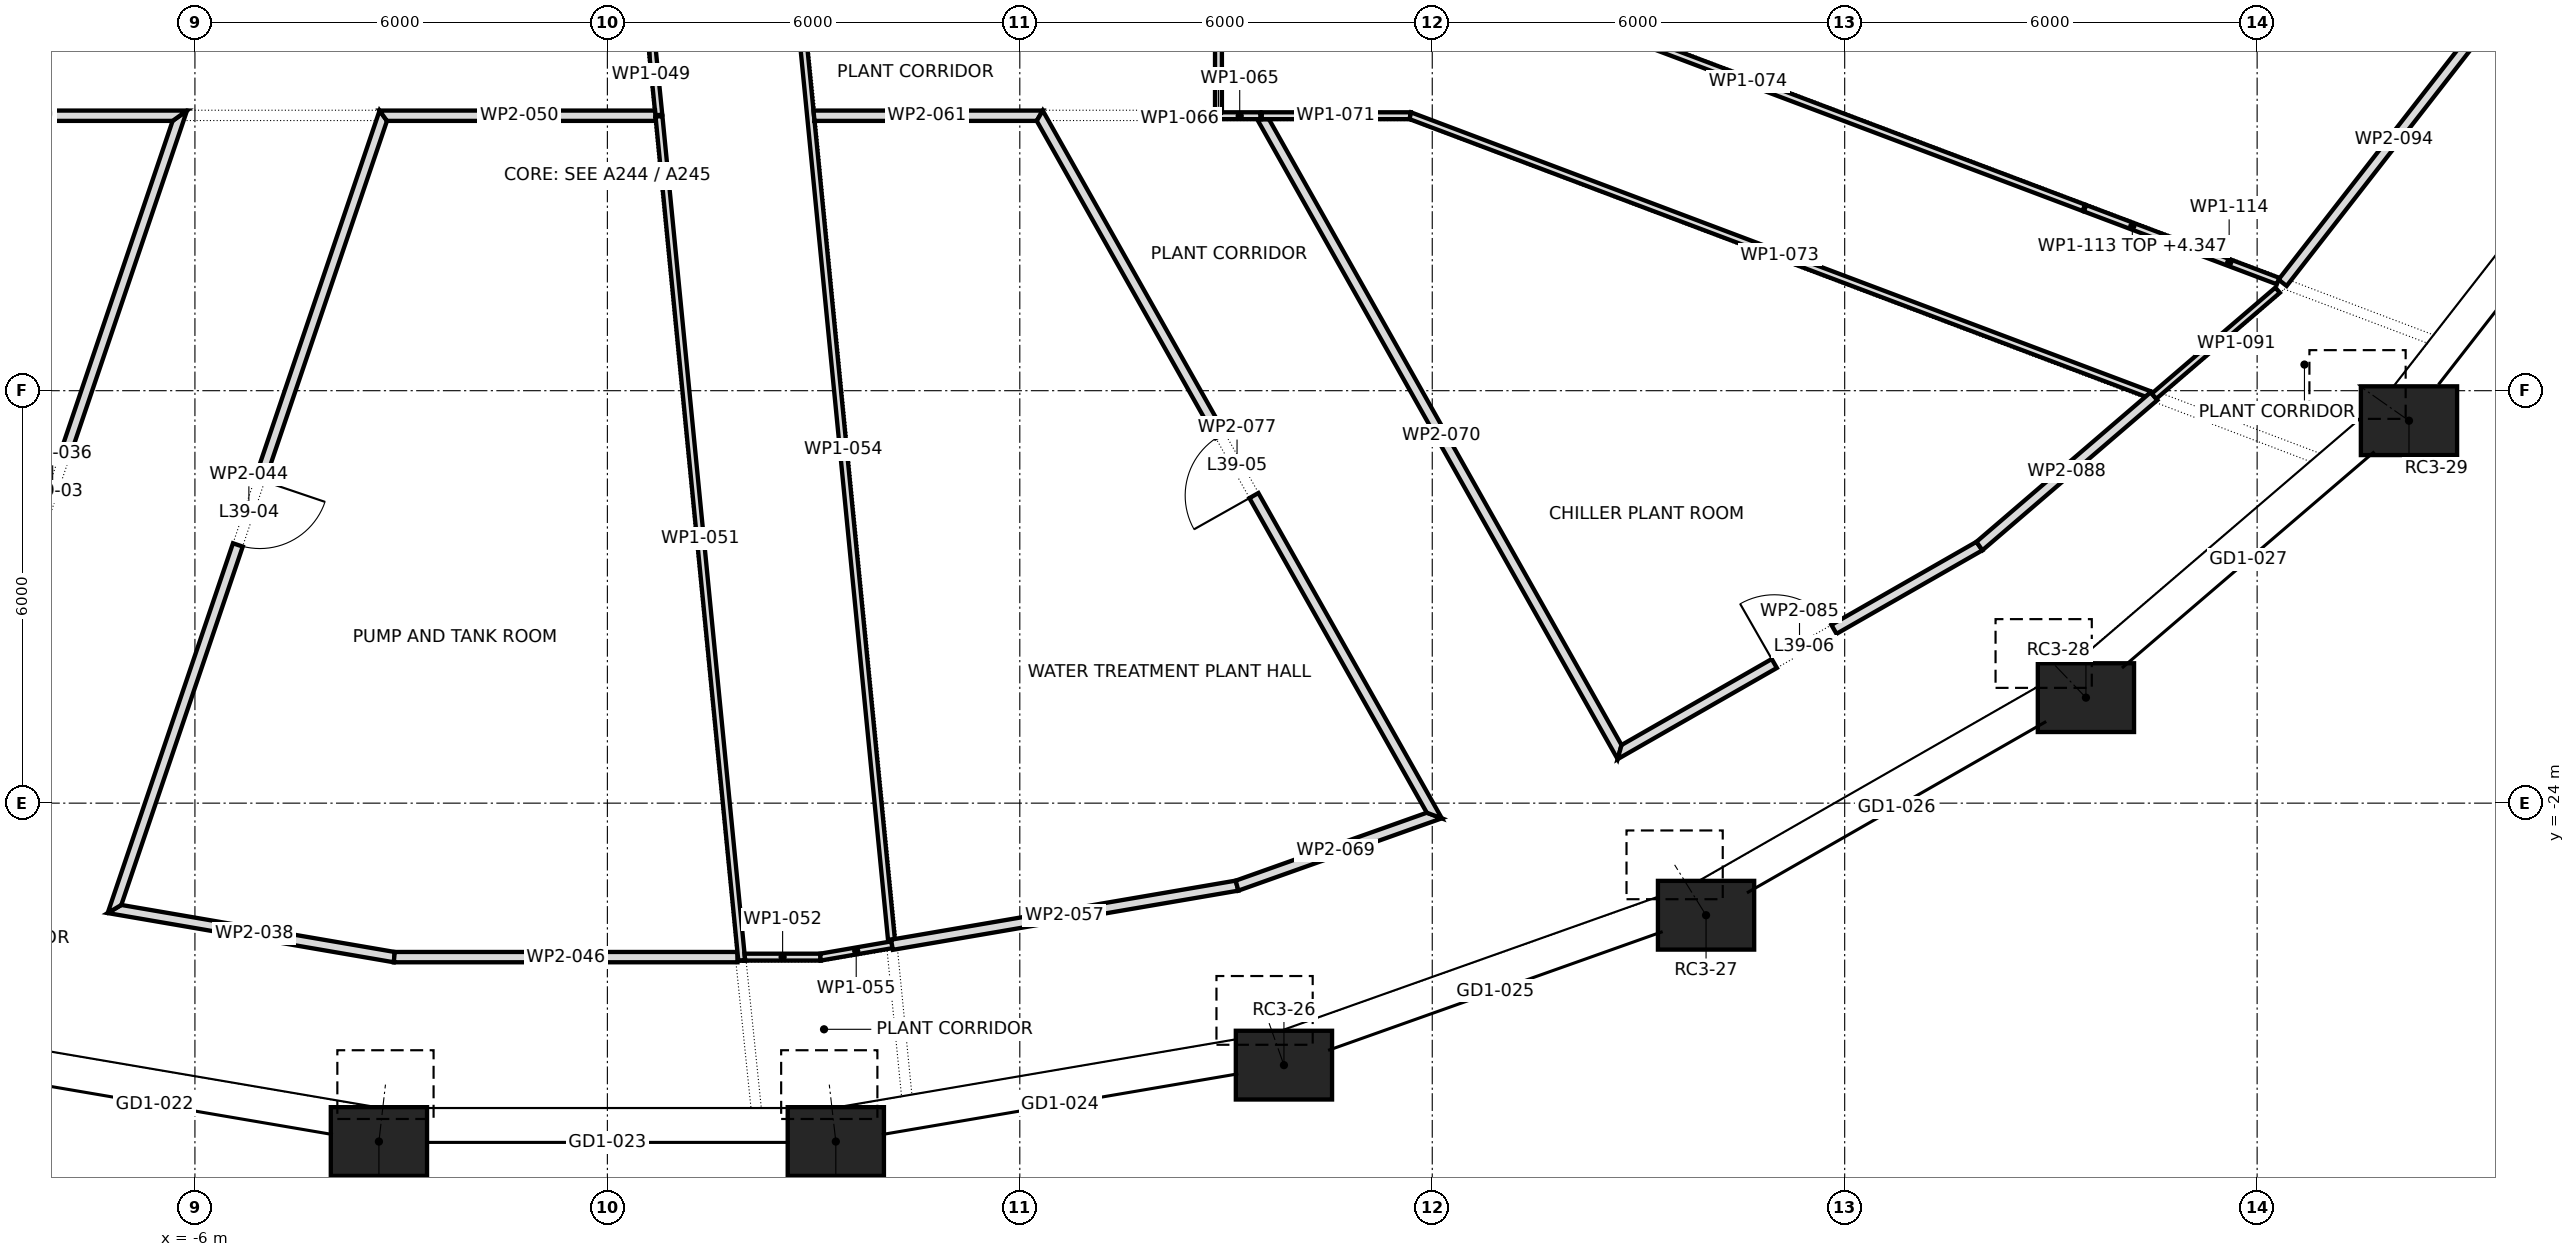
"""IFC4 building model, lengths in metres.
Left out: names, types, materials, properties, quantities, classifications, styles, units other than length and angle.
Written with IfcOpenShell. Run it as: python <this file> out.ifc"""

import sys

from ifc_helpers import new_model, si_unit, direction, frame, frame_2d, origin, origin_2d, place, context, subcontext, project, spatial, polyline, rectangle, outline, extrude, element, fill, save


model = new_model("IFC4")
c1 = context("Model", 3, precision=1e-05, world=origin(), true_north=direction((0.0, 1.0)))
c2 = subcontext(c1, "Body", "Model", "MODEL_VIEW")
j1 = project(units=[si_unit("LENGTHUNIT", "METRE"), si_unit("PLANEANGLEUNIT", "RADIAN")], contexts=[c1])
p1 = place(None, origin())
s1 = spatial("IfcSite", under=j1, at=p1, CompositionType="ELEMENT")
p2 = place(p1, origin())
s2 = spatial("IfcBuilding", under=s1, at=p2, CompositionType="ELEMENT")
p3 = place(p2, frame((0.0, 0.0, 173.5)))
s3 = spatial("IfcBuildingStorey", under=s2, at=p3, CompositionType="ELEMENT", Elevation=173.5)
for number, where, z_axis, x_axis in (
    (1, (-3.323, -28.923, 0.078), (0.018, 0.156, 0.988), (-0.993, 0.114, 0.0)),
    (2, (3.323, -28.923, 0.078), (-0.018, 0.156, 0.988), (-0.993, -0.114, 0.0)),
):
    element("IfcColumn", number, at=place(p3, frame(where, z_axis=z_axis, x_axis=x_axis)), inside=s3, PredefinedType="COLUMN", context=c2, shape_type="SweptSolid", body=[
        extrude(rectangle(XDim=1.4, YDim=1.0, at=origin_2d()), origin(), (0.0, 0.0, 1.0), 5.31),
    ])
p4 = place(p3, frame((9.843, -27.811, 0.079), z_axis=(-0.053064720362, 0.149997502446, 0.987261305184), x_axis=(-0.942744642547, -0.333515425352, 0.0)))
e3 = element("IfcColumn", 3, at=p4, inside=s3, PredefinedType="COLUMN", context=c2, shape_type="SweptSolid", body=[
    extrude(rectangle(XDim=1.4, YDim=1.0, at=origin_2d()), origin(), (0.0, 0.0, 1.0), 5.309),
])
p5 = place(p3, frame((15.983, -25.631, 0.081), z_axis=(-0.086138821713, 0.138107251256, 0.98666432516), x_axis=(-0.848490015543, -0.529211388316, 0.0)))
e4 = element("IfcColumn", 4, at=p5, inside=s3, PredefinedType="COLUMN", context=c2, shape_type="SweptSolid", body=[
    extrude(rectangle(XDim=1.4, YDim=1.0, at=origin_2d()), origin(), (0.0, 0.0, 1.0), 5.309),
])
p6 = place(p3, frame((21.51, -22.465, 0.083), z_axis=(-0.115812481815, 0.12096379157, 0.985877898213), x_axis=(-0.722319686129, -0.691559304059, 0.0)))
e5 = element("IfcColumn", 5, at=p6, inside=s3, PredefinedType="COLUMN", context=c2, shape_type="SweptSolid", body=[
    extrude(rectangle(XDim=1.4, YDim=1.0, at=origin_2d()), origin(), (0.0, 0.0, 1.0), 5.308),
])
p7 = place(p3, frame((26.209, -18.437, 0.086), z_axis=(-0.140981154169, 0.099215774729, 0.985028194629), x_axis=(-0.575519842584, -0.817787815262, 0.0)))
e6 = element("IfcColumn", 6, at=p7, inside=s3, PredefinedType="COLUMN", context=c2, shape_type="SweptSolid", body=[
    extrude(rectangle(XDim=1.4, YDim=1.0, at=origin_2d()), origin(), (0.0, 0.0, 1.0), 5.308),
])
p8 = place(p3, frame((-9.944, -25.002, 0.0), z_axis=(0.0, 0.0, 1.0), x_axis=(0.320636430017, 0.947202343613, 0.0)))
e7 = element("IfcWall", 7, at=p8, inside=s3, PredefinedType="PARTITIONING", context=c2, shape_type="SweptSolid", body=[
    extrude(outline(polyline([(0.0, -0.075), (1.953, -0.075), (3.906, -0.075), (5.86, -0.075), (7.813, -0.075), (9.766, -0.075), (11.72, -0.075), (11.511, 0.075), (9.617, 0.075), (7.724, 0.075), (5.831, 0.075), (3.938, 0.075), (2.045, 0.075), (0.152, 0.075), (0.0, -0.075), (0.0, -0.075)])), origin(), (0.0, 0.0, 1.0), 5.1),
])
p9 = place(p8, frame((5.346, 0.0, 0.0)))
e8 = element("IfcOpeningElement", 8, at=p9, cuts=e7, PredefinedType="OPENING", context=c2, shape_type="SweptSolid", body=[
    extrude(rectangle(XDim=1.0, YDim=2.1, at=frame_2d((0.5, 1.05))), frame((0.0, 0.087, 0.0), z_axis=(0.0, -1.0, 0.0), x_axis=(1.0, 0.0, 0.0)), (0.0, 0.0, 1.0), 0.174),
])
p10 = place(p3, frame((-7.257, -25.525, 0.0), z_axis=(0.0, 0.0, 1.0), x_axis=(0.985526115986, -0.16952367006, 0.0)))
e9 = element("IfcWall", 9, at=p10, inside=s3, PredefinedType="PARTITIONING", context=c2, shape_type="SweptSolid", body=[
    extrude(outline(polyline([(4.224, -0.075), (4.224, -0.073), (4.211, 0.075), (2.866, 0.075), (1.521, 0.075), (0.176, 0.075), (0.0, -0.075), (1.408, -0.075), (2.816, -0.075), (4.224, -0.075)])), origin(), (0.0, 0.0, 1.0), 5.1),
])
p11 = place(p3, frame((-6.115, -14.0, 0.0), z_axis=(0.0, 0.0, 1.0), x_axis=(-1.0, 0.0, 0.0)))
e10 = element("IfcWall", 10, at=p11, inside=s3, PredefinedType="PARTITIONING", context=c2, shape_type="SweptSolid", body=[
    extrude(outline(polyline([(0.0, -0.075), (1.611, -0.075), (3.223, -0.075), (4.834, -0.075), (4.99, 0.075), (3.397, 0.075), (1.803, 0.075), (0.209, 0.075), (0.104, 0.0), (0.0, -0.075)])), origin(), (0.0, 0.0, 1.0), 5.1),
])
p12 = place(p3, frame((-3.243, -13.949, 0.0), z_axis=(0.0, 0.0, 1.0), x_axis=(-0.320918229821, -0.947106905142, 0.0)))
e11 = element("IfcWall", 11, at=p12, inside=s3, PredefinedType="PARTITIONING", context=c2, shape_type="SweptSolid", body=[
    extrude(outline(polyline([(12.326, -0.075), (12.326, -0.075), (12.15, 0.075), (10.43, 0.075), (8.71, 0.075), (6.989, 0.075), (5.269, 0.075), (3.548, 0.075), (1.828, 0.075), (0.107, 0.075), (0.0, -0.075), (0.0, -0.075), (1.761, -0.075), (3.522, -0.075), (5.282, -0.075), (7.043, -0.075), (8.804, -0.075), (10.565, -0.075), (12.326, -0.075)])), origin(), (0.0, 0.0, 1.0), 5.1),
])
p13 = place(p12, frame((5.646, 0.0, 0.0)))
e12 = element("IfcOpeningElement", 12, at=p13, cuts=e11, PredefinedType="OPENING", context=c2, shape_type="SweptSolid", body=[
    extrude(rectangle(XDim=1.0, YDim=2.1, at=frame_2d((0.5, 1.05))), frame((0.0, 0.087, 0.0), z_axis=(0.0, -1.0, 0.0), x_axis=(1.0, 0.0, 0.0)), (0.0, 0.0, 1.0), 0.174),
])
p14 = place(p3, frame((-3.106, -26.24, 0.0), z_axis=(0.0, 0.0, 1.0), x_axis=(1.0, 0.0, 0.0)))
e13 = element("IfcWall", 13, at=p14, inside=s3, PredefinedType="PARTITIONING", context=c2, shape_type="SweptSolid", body=[
    extrude(outline(polyline([(4.999, 0.075), (3.337, 0.075), (1.675, 0.075), (0.013, 0.075), (0.0, -0.075), (1.666, -0.075), (3.333, -0.075), (4.999, -0.075), (4.999, 0.075)])), origin(), (0.0, 0.0, 1.0), 5.1),
])
p15 = place(p3, frame((0.52, -11.7, 0.0), z_axis=(0.0, 0.0, 1.0), x_axis=(0.099535104197, -0.995034051192, 0.0)))
e14 = element("IfcWall", 14, at=p15, inside=s3, PredefinedType="PARTITIONING", context=c2, shape_type="SweptSolid", body=[
    extrude(outline(polyline([(0.0, -0.05), (2.231, -0.05), (2.231, -0.05), (2.233, -0.05), (2.311, -0.05), (2.311, -0.006), (2.311, 0.05), (0.0, 0.05), (0.0, -0.05)])), origin(), (0.0, 0.0, 1.0), 5.1),
])
p16 = place(p3, frame((0.707, -14.0, 0.0), z_axis=(0.0, 0.0, 1.0), x_axis=(-1.0, 0.0, 0.0)))
e15 = element("IfcWall", 15, at=p16, inside=s3, PredefinedType="PARTITIONING", context=c2, shape_type="SweptSolid", body=[
    extrude(outline(polyline([(4.021, -0.075), (4.021, -0.075), (3.967, 0.0), (3.913, 0.075), (1.957, 0.075), (0.0, 0.075), (0.0, 0.074), (0.007, 0.004), (0.007, 0.004), (0.015, -0.075), (1.35, -0.075), (2.685, -0.075), (4.021, -0.075)])), origin(), (0.0, 0.0, 1.0), 5.1),
])
p17 = place(p3, frame((0.75, -13.999, 0.0), z_axis=(0.0, 0.0, 1.0), x_axis=(0.097559905923, -0.995229654279, 0.0)))
e16 = element("IfcWall", 16, at=p17, inside=s3, PredefinedType="PARTITIONING", context=c2, shape_type="SweptSolid", body=[
    extrude(rectangle(XDim=12.35, YDim=0.1, at=frame_2d((6.175, 0.0))), origin(), (0.0, 0.0, 1.0), 5.1),
])
p18 = place(p3, frame((1.958, -26.24, 0.0), z_axis=(0.0, 0.0, 1.0), x_axis=(1.0, 0.0, 0.0)))
e17 = element("IfcWall", 17, at=p18, inside=s3, PredefinedType="PARTITIONING", context=c2, shape_type="SweptSolid", body=[
    extrude(outline(polyline([(1.147, -0.05), (1.147, -0.05), (1.143, 0.0), (1.138, 0.05), (1.138, 0.05), (1.138, 0.05), (0.038, 0.05), (0.047, -0.045), (0.0, -0.05), (0.0, -0.05), (1.147, -0.05)])), origin(), (0.0, 0.0, 1.0), 5.1),
])
p19 = place(p3, frame((2.73, -11.7, 0.0), z_axis=(0.0, 0.0, 1.0), x_axis=(0.09772373037, -0.99521358136, 0.0)))
e18 = element("IfcWall", 18, at=p19, inside=s3, PredefinedType="PARTITIONING", context=c2, shape_type="SweptSolid", body=[
    extrude(outline(polyline([(14.383, -0.05), (14.383, -0.049), (14.379, -0.004), (14.383, -0.003), (14.383, -0.003), (14.354, -0.005), (14.35, 0.05), (12.357, 0.05), (10.364, 0.05), (8.371, 0.05), (6.378, 0.05), (4.385, 0.05), (2.391, 0.05), (2.391, 0.049), (2.381, 0.05), (0.0, 0.05), (0.0, -0.05), (1.798, -0.05), (3.596, -0.05), (5.394, -0.05), (7.191, -0.05), (8.989, -0.05), (10.787, -0.05), (12.585, -0.05), (14.383, -0.05)])), origin(), (0.0, 0.0, 1.0), 5.1),
])
p20 = place(p3, frame((3.096, -26.241, 0.0), z_axis=(0.0, 0.0, 1.0), x_axis=(0.985360182955, 0.170485512132, 0.0)))
e19 = element("IfcWall", 19, at=p20, inside=s3, PredefinedType="PARTITIONING", context=c2, shape_type="SweptSolid", body=[
    extrude(outline(polyline([(1.06, 0.05), (0.009, 0.05), (0.0, -0.05), (1.06, -0.05), (1.06, 0.05)])), origin(), (0.0, 0.0, 1.0), 5.1),
])
p21 = place(p3, frame((4.14, -26.06, 0.0), z_axis=(0.0, 0.0, 1.0), x_axis=(0.985642520361, 0.168845556817, 0.0)))
e20 = element("IfcWall", 20, at=p21, inside=s3, PredefinedType="PARTITIONING", context=c2, shape_type="SweptSolid", body=[
    extrude(outline(polyline([(0.0, -0.075), (1.7, -0.075), (3.4, -0.075), (5.1, -0.075), (5.087, 0.075), (3.391, 0.075), (1.696, 0.075), (0.0, 0.075), (0.0, -0.075)])), origin(), (0.0, 0.0, 1.0), 5.1),
])
p22 = place(p3, frame((6.334, -14.0, 0.0), z_axis=(0.0, 0.0, 1.0), x_axis=(-1.0, 0.0, 0.0)))
e21 = element("IfcWall", 21, at=p22, inside=s3, PredefinedType="PARTITIONING", context=c2, shape_type="SweptSolid", body=[
    extrude(outline(polyline([(3.335, -0.075), (3.335, -0.072), (3.32, 0.075), (1.704, 0.075), (0.087, 0.075), (0.044, 0.0), (0.0, -0.075), (0.0, -0.075), (1.667, -0.075), (3.335, -0.075)])), origin(), (0.0, 0.0, 1.0), 5.1),
])
p23 = place(p3, frame((8.84, -14.0, 0.0), z_axis=(0.0, 0.0, 1.0), x_axis=(1.0, 0.0, 0.0)))
e22 = element("IfcWall", 22, at=p23, inside=s3, PredefinedType="PARTITIONING", context=c2, shape_type="SweptSolid", body=[
    extrude(outline(polyline([(0.669, 0.05), (0.1, 0.05), (0.0, -0.05), (0.0, -0.05), (0.669, -0.05), (0.669, 0.05)])), origin(), (0.0, 0.0, 1.0), 5.1),
])
p24 = place(p3, frame((8.89, -12.916, 0.0), z_axis=(0.0, 0.0, 1.0), x_axis=(0.0, -1.0, 0.0)))
e23 = element("IfcWall", 23, at=p24, inside=s3, PredefinedType="PARTITIONING", context=c2, shape_type="SweptSolid", body=[
    extrude(outline(polyline([(1.135, -0.05), (1.135, -0.05), (1.034, 0.05), (0.0, 0.05), (0.069, -0.05), (1.135, -0.05)])), origin(), (0.0, 0.0, 1.0), 5.1),
])
p25 = place(p3, frame((9.154, -25.202, 0.0), z_axis=(0.0, 0.0, 1.0), x_axis=(0.942266464774, 0.334864016224, 0.0)))
e24 = element("IfcWall", 24, at=p25, inside=s3, PredefinedType="PARTITIONING", context=c2, shape_type="SweptSolid", body=[
    extrude(outline(polyline([(0.0, -0.075), (1.571, -0.075), (3.142, -0.075), (2.963, 0.075), (1.488, 0.075), (0.013, 0.075), (0.0, -0.075)])), origin(), (0.0, 0.0, 1.0), 5.1),
])
p26 = place(p3, frame((9.518, -14.014, 0.0), z_axis=(0.0, 0.0, 1.0), x_axis=(0.490856680629, -0.871240333709, 0.0)))
e25 = element("IfcWall", 25, at=p26, inside=s3, PredefinedType="PARTITIONING", context=c2, shape_type="SweptSolid", body=[
    extrude(outline(polyline([(0.0, -0.075), (1.781, -0.075), (3.562, -0.075), (5.343, -0.075), (7.123, -0.075), (8.904, -0.075), (10.685, -0.075), (10.626, -0.017), (10.534, 0.075), (8.792, 0.075), (7.051, 0.075), (5.309, 0.075), (3.567, 0.075), (1.826, 0.075), (0.084, 0.075), (0.028, -0.024), (0.0, -0.009), (0.0, -0.009), (0.028, -0.025), (0.0, -0.074), (0.0, -0.075)])), origin(), (0.0, 0.0, 1.0), 5.1),
])
p27 = place(p3, frame((9.51, -14.0, 0.0), z_axis=(0.0, 0.0, 1.0), x_axis=(1.0, 0.0, 0.0)))
e26 = element("IfcWall", 26, at=p27, inside=s3, PredefinedType="PARTITIONING", context=c2, shape_type="SweptSolid", body=[
    extrude(outline(polyline([(0.0, -0.05), (2.161, -0.05), (2.179, 0.05), (0.0, 0.05), (0.0, -0.05)])), origin(), (0.0, 0.0, 1.0), 5.1),
])
p28 = place(p3, frame((11.671, -13.997, 0.0), z_axis=(0.0, 0.0, 1.0), x_axis=(0.935692249909, -0.352817252215, 0.0)))
e27 = element("IfcWall", 27, at=p28, inside=s3, PredefinedType="PARTITIONING", context=c2, shape_type="SweptSolid", body=[
    extrude(outline(polyline([(0.018, -0.05), (1.925, -0.05), (3.832, -0.05), (5.739, -0.05), (7.646, -0.05), (9.553, -0.05), (11.46, -0.05), (11.507, 0.036), (11.529, 0.024), (11.543, 0.049), (11.543, 0.05), (9.619, 0.05), (7.695, 0.05), (5.771, 0.05), (3.848, 0.05), (1.924, 0.05), (0.0, 0.05), (0.009, 0.0), (0.018, -0.05), (0.018, -0.05), (0.018, -0.05)])), origin(), (0.0, 0.0, 1.0), 5.1),
])
p29 = place(p3, frame((11.7, -11.65, 0.0), z_axis=(0.0, 0.0, 1.0), x_axis=(0.935630078932, -0.352982089343, 0.0)))
e28 = element("IfcWall", 28, at=p29, inside=s3, PredefinedType="PARTITIONING", context=c2, shape_type="SweptSolid", body=[
    extrude(rectangle(XDim=10.461, YDim=0.1, at=frame_2d((5.23, 0.0))), origin(), (0.0, 0.0, 1.0), 5.1),
])
p30 = place(p3, frame((12.074, -24.258, 0.0), z_axis=(0.0, 0.0, 1.0), x_axis=(-0.491143591973, 0.87107862565, 0.0)))
e29 = element("IfcWall", 29, at=p30, inside=s3, PredefinedType="PARTITIONING", context=c2, shape_type="SweptSolid", body=[
    extrude(outline(polyline([(0.0, -0.075), (1.97, -0.075), (3.94, -0.075), (5.91, -0.075), (7.88, -0.075), (9.85, -0.075), (11.82, -0.075), (11.732, 0.075), (9.807, 0.075), (7.881, 0.075), (5.955, 0.075), (4.03, 0.075), (2.104, 0.075), (0.178, 0.075), (0.0, -0.075)])), origin(), (0.0, 0.0, 1.0), 5.1),
])
p31 = place(p30, frame((5.433, 0.0, 0.0)))
e30 = element("IfcOpeningElement", 30, at=p31, cuts=e29, PredefinedType="OPENING", context=c2, shape_type="SweptSolid", body=[
    extrude(rectangle(XDim=1.0, YDim=2.1, at=frame_2d((0.5, 1.05))), frame((0.0, 0.087, 0.0), z_axis=(0.0, -1.0, 0.0), x_axis=(1.0, 0.0, 0.0)), (0.0, 0.0, 1.0), 0.174),
])
p32 = place(p3, frame((14.66, -23.295, 0.0), z_axis=(0.0, 0.0, 1.0), x_axis=(0.867839906405, 0.496843936111, 0.0)))
e31 = element("IfcWall", 31, at=p32, inside=s3, PredefinedType="PARTITIONING", context=c2, shape_type="SweptSolid", body=[
    extrude(outline(polyline([(0.0, -0.075), (1.529, -0.075), (3.057, -0.075), (4.586, -0.075), (6.115, -0.075), (6.101, 0.075), (4.117, 0.075), (2.134, 0.075), (0.151, 0.075), (0.0, -0.075)])), origin(), (0.0, 0.0, 1.0), 5.1),
])
p33 = place(p32, frame((2.669, 0.0, 0.0)))
e32 = element("IfcOpeningElement", 32, at=p33, cuts=e31, PredefinedType="OPENING", context=c2, shape_type="SweptSolid", body=[
    extrude(rectangle(XDim=1.0, YDim=2.1, at=frame_2d((0.5, 1.05))), frame((0.0, 0.087, 0.0), z_axis=(0.0, -1.0, 0.0), x_axis=(1.0, 0.0, 0.0)), (0.0, 0.0, 1.0), 0.174),
])
p34 = place(p3, frame((19.955, -20.265, 0.0), z_axis=(0.0, 0.0, 1.0), x_axis=(0.75884543571, 0.651270761436, 0.0)))
e33 = element("IfcWall", 33, at=p34, inside=s3, PredefinedType="PARTITIONING", context=c2, shape_type="SweptSolid", body=[
    extrude(outline(polyline([(3.354, 0.075), (1.684, 0.075), (0.014, 0.075), (0.0, -0.075), (1.677, -0.075), (3.354, -0.075), (3.354, 0.075)])), origin(), (0.0, 0.0, 1.0), 5.1),
])
p35 = place(p3, frame((22.5, -18.08, 0.0), z_axis=(0.0, 0.0, 1.0), x_axis=(0.758900038002, 0.651207134728, 0.0)))
e34 = element("IfcWall", 34, at=p35, inside=s3, PredefinedType="PARTITIONING", context=c2, shape_type="SweptSolid", body=[
    extrude(rectangle(XDim=2.369, YDim=0.1, at=frame_2d((1.185, 0.0))), origin(), (0.0, 0.0, 1.0), 5.1),
])
p36 = place(p3, frame((24.37, -16.43, 0.0), z_axis=(0.0, 0.0, 1.0), x_axis=(0.614465385261, 0.788943781467, 0.0)))
e35 = element("IfcWall", 35, at=p36, inside=s3, PredefinedType="PARTITIONING", context=c2, shape_type="SweptSolid", body=[
    extrude(outline(polyline([(0.0, -0.075), (1.76, -0.075), (3.521, -0.075), (5.281, -0.075), (5.265, 0.075), (3.51, 0.075), (1.755, 0.075), (0.0, 0.075), (0.0, -0.075)])), origin(), (0.0, 0.0, 1.0), 5.1),
])
p37 = place(p3, frame((21.488, -15.343, 0.0), z_axis=(0.0, 0.0, 1.0), x_axis=(0.935620103048, -0.353008530735, 0.0)))
e36 = element("IfcWall", 36, at=p37, inside=s3, PredefinedType="PARTITIONING", context=c2, shape_type="SweptSolid", body=[
    extrude(rectangle(XDim=1.49, YDim=0.1, at=frame_2d((0.745, 0.0))), origin(), (0.0, 0.0, 1.0), 4.347),
])
p38 = place(p3, frame((22.882, -15.868, 0.0), z_axis=(0.0, 0.0, 1.0), x_axis=(0.935614725435, -0.353022783327, 0.0)))
e37 = element("IfcWall", 37, at=p38, inside=s3, PredefinedType="PARTITIONING", context=c2, shape_type="SweptSolid", body=[
    extrude(rectangle(XDim=1.521, YDim=0.1, at=frame_2d((0.76, 0.0))), origin(), (0.0, 0.0, 1.0), 5.1),
])
p39 = place(p9, origin())
e38 = element("IfcDoor", 38, at=p39, inside=s3, OperationType="SINGLE_SWING_LEFT", PredefinedType="DOOR", context=c2, shape_type="SweptSolid", body=[
    extrude(rectangle(XDim=1.0, YDim=2.1, at=frame_2d((0.5, 1.05))), frame((0.0, 0.025, 0.0), z_axis=(0.0, -1.0, 0.0), x_axis=(1.0, 0.0, 0.0)), (0.0, 0.0, 1.0), 0.05),
])
fill(e8, e38)
p40 = place(p13, origin())
e39 = element("IfcDoor", 39, at=p40, inside=s3, OperationType="SINGLE_SWING_RIGHT", PredefinedType="DOOR", context=c2, shape_type="SweptSolid", body=[
    extrude(rectangle(XDim=1.0, YDim=2.1, at=frame_2d((0.5, 1.05))), frame((0.0, 0.025, 0.0), z_axis=(0.0, -1.0, 0.0), x_axis=(1.0, 0.0, 0.0)), (0.0, 0.0, 1.0), 0.05),
])
fill(e12, e39)
p41 = place(p31, origin())
e40 = element("IfcDoor", 40, at=p41, inside=s3, OperationType="SINGLE_SWING_RIGHT", PredefinedType="DOOR", context=c2, shape_type="SweptSolid", body=[
    extrude(rectangle(XDim=1.0, YDim=2.1, at=frame_2d((0.5, 1.05))), frame((0.0, 0.025, 0.0), z_axis=(0.0, -1.0, 0.0), x_axis=(1.0, 0.0, 0.0)), (0.0, 0.0, 1.0), 0.05),
])
fill(e30, e40)
p42 = place(p33, origin())
e41 = element("IfcDoor", 41, at=p42, inside=s3, OperationType="SINGLE_SWING_RIGHT", PredefinedType="DOOR", context=c2, shape_type="SweptSolid", body=[
    extrude(rectangle(XDim=1.0, YDim=2.1, at=frame_2d((0.5, 1.05))), frame((0.0, 0.025, 0.0), z_axis=(0.0, -1.0, 0.0), x_axis=(1.0, 0.0, 0.0)), (0.0, 0.0, 1.0), 0.05),
])
fill(e32, e41)
save(model, sys.argv[1])
